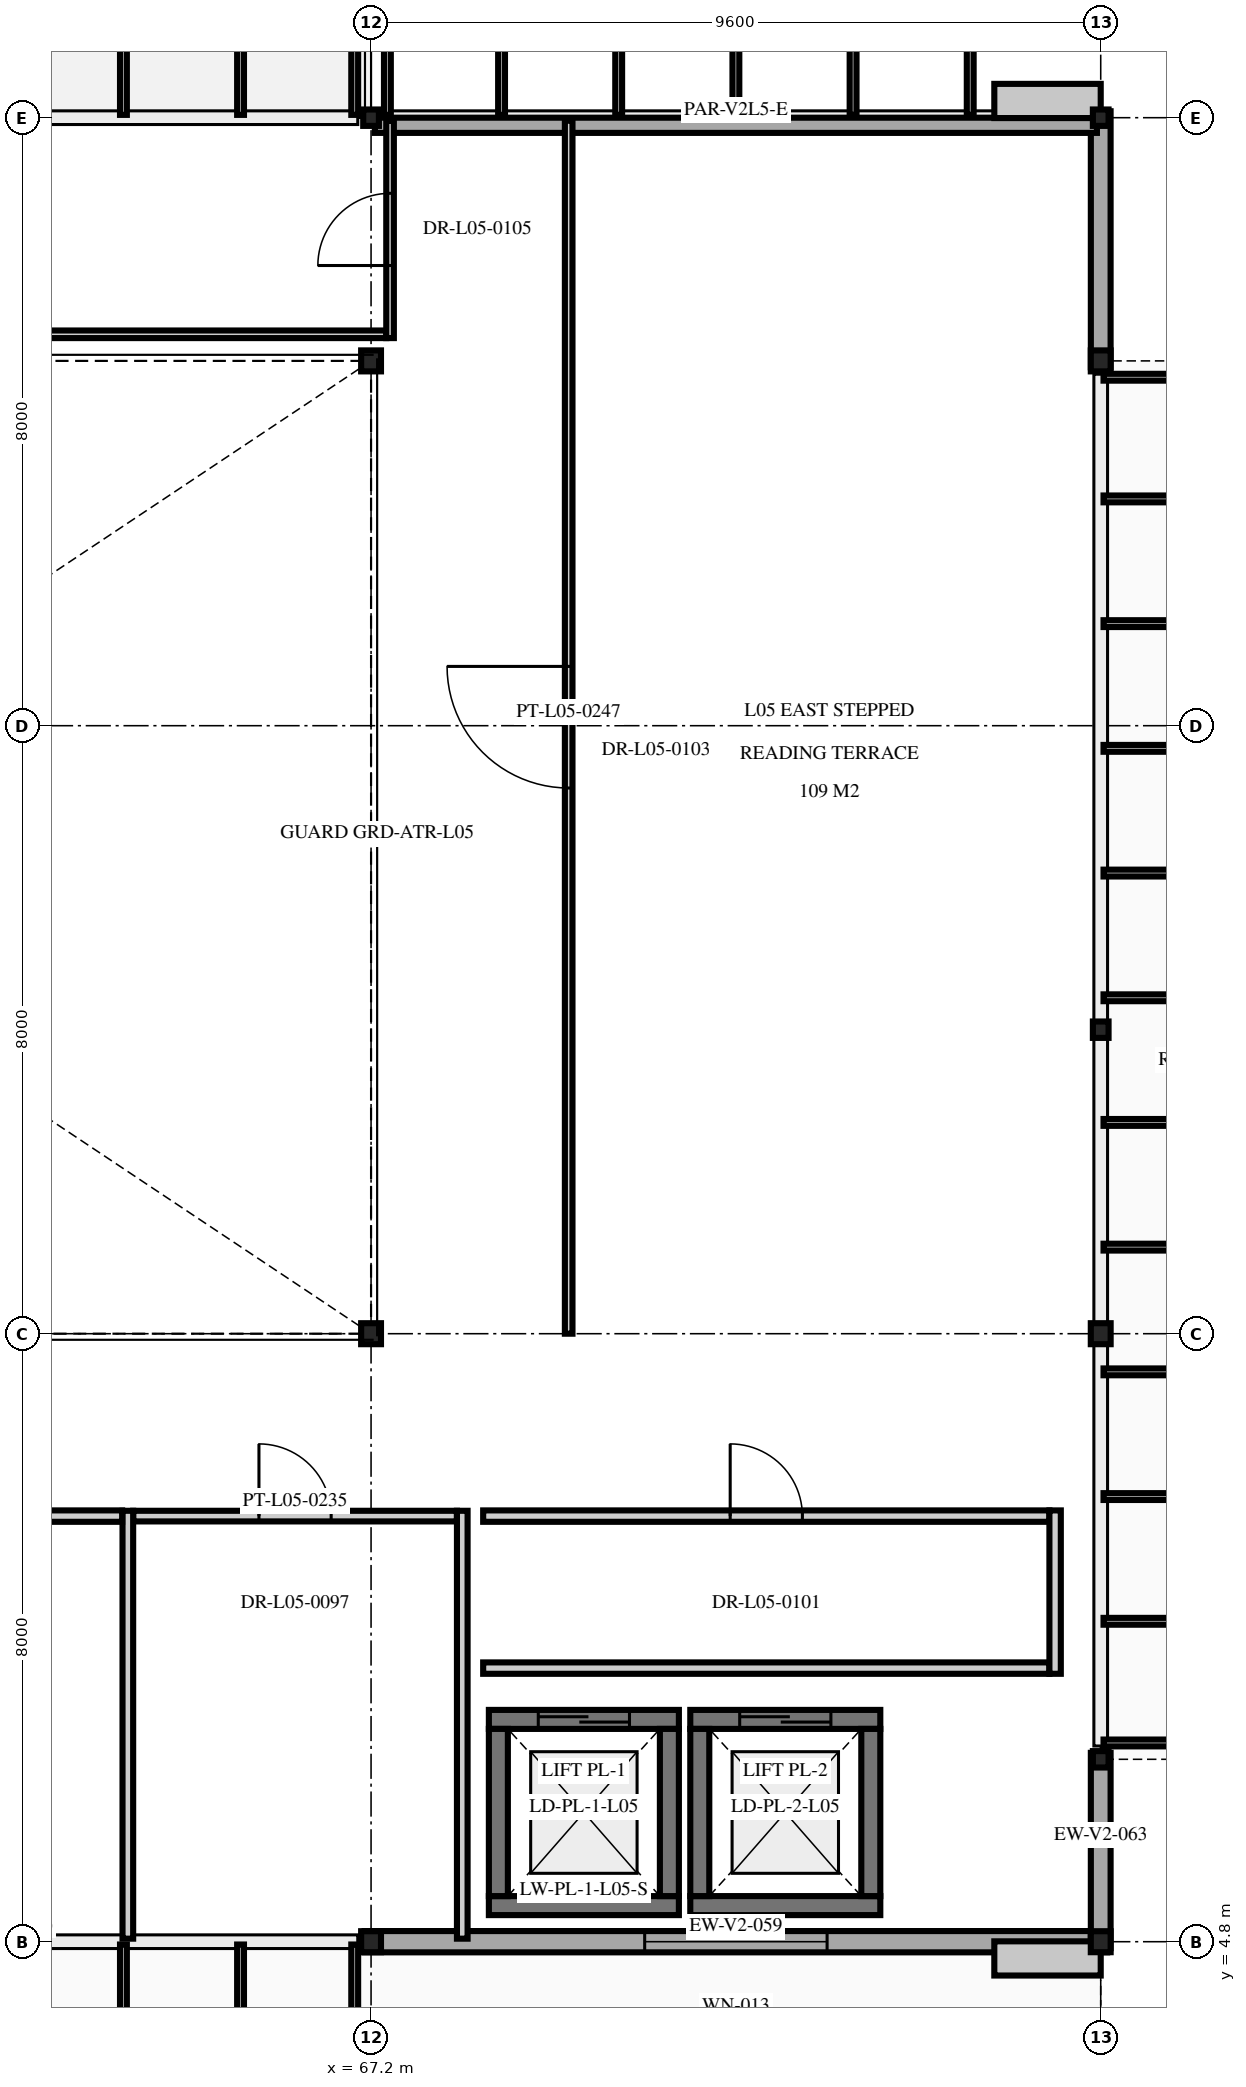
"""IFC4 building model, lengths in metres.
Left out: names, types, materials, properties, quantities, classifications, styles, units other than length and angle.
Written with IfcOpenShell. Run it as: python <this file> out.ifc"""

import sys

from ifc_helpers import new_model, si_unit, direction, frame, frame_2d, origin, origin_2d, place, context, subcontext, project, spatial, rectangle, i_section, extrude, element, fill, save


model = new_model("IFC4")
c1 = context("Model", 3, precision=1e-05, world=origin(), true_north=direction((0.0, 1.0)))
c2 = subcontext(c1, "Body", "Model", "MODEL_VIEW")
j1 = project(units=[si_unit("LENGTHUNIT", "METRE"), si_unit("PLANEANGLEUNIT", "RADIAN")], contexts=[c1])
p1 = place(None, origin())
s1 = spatial("IfcSite", under=j1, at=p1, CompositionType="ELEMENT")
p2 = place(p1, origin())
s2 = spatial("IfcBuilding", under=s1, at=p2, CompositionType="ELEMENT")
p3 = place(p2, frame((0.0, 0.0, 23.1)))
s3 = spatial("IfcBuildingStorey", under=s2, at=p3, CompositionType="ELEMENT", Elevation=23.1)
for number, where, z_axis, x_axis in (
    (1, (67.2, 4.8, 0.0), (0.0, 0.0, 1.0), (1.0, 0.0, 0.0)),
    (2, (67.2, 12.8, 0.0), (0.0, 0.0, 1.0), (1.0, 0.0, 0.0)),
    (3, (67.2, 25.6, 0.0), (0.0, 0.0, 1.0), (1.0, 0.0, 0.0)),
):
    element("IfcColumn", number, at=place(p3, frame(where, z_axis=z_axis, x_axis=x_axis)), inside=s3, PredefinedType="COLUMN", context=c2, shape_type="SweptSolid", body=[
        extrude(i_section(OverallWidth=0.261, OverallDepth=0.276, WebThickness=0.015, FlangeThickness=0.025, at=origin_2d()), origin(), (0.0, 0.0, 1.0), 4.5),
    ])
for number, where, z_axis, x_axis in (
    (4, (76.8, 4.8, 0.0), (0.0, 0.0, 1.0), (1.0, 0.0, 0.0)),
    (5, (76.8, 12.8, 0.0), (0.0, 0.0, 1.0), (1.0, 0.0, 0.0)),
    (6, (76.8, 25.6, 0.0), (0.0, 0.0, 1.0), (1.0, 0.0, 0.0)),
):
    element("IfcColumn", number, at=place(p3, frame(where, z_axis=z_axis, x_axis=x_axis)), inside=s3, PredefinedType="COLUMN", context=c2, shape_type="SweptSolid", body=[
        extrude(i_section(OverallWidth=0.261, OverallDepth=0.276, WebThickness=0.015, FlangeThickness=0.025, at=origin_2d()), origin(), (0.0, 0.0, 1.0), 3.793),
    ])
p4 = place(p3, frame((67.2, 28.8, 0.0), z_axis=(0.0, 0.0, 1.0), x_axis=(1.0, 0.0, 0.0)))
e7 = element("IfcColumn", 7, at=p4, inside=s3, PredefinedType="COLUMN", context=c2, shape_type="SweptSolid", body=[
    extrude(i_section(OverallWidth=0.206, OverallDepth=0.216, WebThickness=0.01, FlangeThickness=0.017, at=origin_2d()), origin(), (0.0, 0.0, 1.0), 4.5),
])
for number, where, z_axis, x_axis in (
    (8, (76.8, 28.8, 0.0), (0.0, 0.0, 1.0), (1.0, 0.0, 0.0)),
    (9, (76.8, 7.2, 0.0), (0.0, 0.0, 1.0), (1.0, 0.0, 0.0)),
    (10, (76.8, 16.8, 0.0), (0.0, 0.0, 1.0), (1.0, 0.0, 0.0)),
):
    element("IfcColumn", number, at=place(p3, frame(where, z_axis=z_axis, x_axis=x_axis)), inside=s3, PredefinedType="COLUMN", context=c2, shape_type="SweptSolid", body=[
        extrude(i_section(OverallWidth=0.206, OverallDepth=0.216, WebThickness=0.01, FlangeThickness=0.017, at=origin_2d()), origin(), (0.0, 0.0, 1.0), 3.793),
    ])
p5 = place(p3, frame((71.25, 5.275, 0.0), z_axis=(0.0, 0.0, 1.0), x_axis=(-1.0, 0.0, 0.0)))
e11 = element("IfcWall", 11, at=p5, inside=s3, PredefinedType="SHEAR", context=c2, shape_type="SweptSolid", body=[
    extrude(rectangle(XDim=2.5, YDim=0.25, at=frame_2d((1.25, 0.0))), origin(), (0.0, 0.0, 1.0), 5.636),
])
p6 = place(p3, frame((68.75, 7.725, 0.0), z_axis=(0.0, 0.0, 1.0), x_axis=(1.0, 0.0, 0.0)))
e12 = element("IfcWall", 12, at=p6, inside=s3, PredefinedType="SHEAR", context=c2, shape_type="SweptSolid", body=[
    extrude(rectangle(XDim=2.5, YDim=0.25, at=frame_2d((1.25, 0.0))), origin(), (0.0, 0.0, 1.0), 5.636),
])
p7 = place(p6, frame((0.65, 0.0, 0.0)))
e13 = element("IfcOpeningElement", 13, at=p7, cuts=e12, PredefinedType="OPENING", context=c2, shape_type="SweptSolid", body=[
    extrude(rectangle(XDim=1.2, YDim=2.2, at=frame_2d((0.6, 1.1))), frame((0.0, 0.135, 0.0), z_axis=(0.0, -1.0, 0.0), x_axis=(1.0, 0.0, 0.0)), (0.0, 0.0, 1.0), 0.27),
])
p8 = place(p3, frame((68.875, 5.4, 0.0), z_axis=(0.0, 0.0, 1.0), x_axis=(0.0, 1.0, 0.0)))
e14 = element("IfcWall", 14, at=p8, inside=s3, PredefinedType="SHEAR", context=c2, shape_type="SweptSolid", body=[
    extrude(rectangle(XDim=2.2, YDim=0.25, at=frame_2d((1.1, 0.0))), origin(), (0.0, 0.0, 1.0), 6.23),
])
p9 = place(p3, frame((71.125, 7.6, 0.0), z_axis=(0.0, 0.0, 1.0), x_axis=(0.0, -1.0, 0.0)))
e15 = element("IfcWall", 15, at=p9, inside=s3, PredefinedType="SHEAR", context=c2, shape_type="SweptSolid", body=[
    extrude(rectangle(XDim=2.2, YDim=0.25, at=frame_2d((1.1, 0.0))), origin(), (0.0, 0.0, 1.0), 5.667),
])
p10 = place(p3, frame((73.9, 5.275, 0.0), z_axis=(0.0, 0.0, 1.0), x_axis=(-1.0, 0.0, 0.0)))
e16 = element("IfcWall", 16, at=p10, inside=s3, PredefinedType="SHEAR", context=c2, shape_type="SweptSolid", body=[
    extrude(rectangle(XDim=2.5, YDim=0.25, at=frame_2d((1.25, 0.0))), origin(), (0.0, 0.0, 1.0), 4.973),
])
p11 = place(p3, frame((71.4, 7.725, 0.0), z_axis=(0.0, 0.0, 1.0), x_axis=(1.0, 0.0, 0.0)))
e17 = element("IfcWall", 17, at=p11, inside=s3, PredefinedType="SHEAR", context=c2, shape_type="SweptSolid", body=[
    extrude(rectangle(XDim=2.5, YDim=0.25, at=frame_2d((1.25, 0.0))), origin(), (0.0, 0.0, 1.0), 4.973),
])
p12 = place(p11, frame((0.65, 0.0, 0.0)))
e18 = element("IfcOpeningElement", 18, at=p12, cuts=e17, PredefinedType="OPENING", context=c2, shape_type="SweptSolid", body=[
    extrude(rectangle(XDim=1.2, YDim=2.2, at=frame_2d((0.6, 1.1))), frame((0.0, 0.135, 0.0), z_axis=(0.0, -1.0, 0.0), x_axis=(1.0, 0.0, 0.0)), (0.0, 0.0, 1.0), 0.27),
])
p13 = place(p3, frame((71.525, 5.4, 0.0), z_axis=(0.0, 0.0, 1.0), x_axis=(0.0, 1.0, 0.0)))
e19 = element("IfcWall", 19, at=p13, inside=s3, PredefinedType="SHEAR", context=c2, shape_type="SweptSolid", body=[
    extrude(rectangle(XDim=2.2, YDim=0.25, at=frame_2d((1.1, 0.0))), origin(), (0.0, 0.0, 1.0), 5.567),
])
p14 = place(p3, frame((73.775, 7.6, 0.0), z_axis=(0.0, 0.0, 1.0), x_axis=(0.0, -1.0, 0.0)))
e20 = element("IfcWall", 20, at=p14, inside=s3, PredefinedType="SHEAR", context=c2, shape_type="SweptSolid", body=[
    extrude(rectangle(XDim=2.2, YDim=0.25, at=frame_2d((1.1, 0.0))), origin(), (0.0, 0.0, 1.0), 5.005),
])
p15 = place(p3, frame((76.885, 4.8, 0.0), z_axis=(0.0, 0.0, 1.0), x_axis=(-1.0, 0.0, 0.0)))
e21 = element("IfcWall", 21, at=p15, inside=s3, PredefinedType="SOLIDWALL", context=c2, shape_type="SweptSolid", body=[
    extrude(rectangle(XDim=9.77, YDim=0.28, at=frame_2d((4.885, 0.0))), origin(), (0.0, 0.0, 1.0), 3.473),
])
p16 = place(p15, frame((3.685, 0.0, 0.95)))
e22 = element("IfcOpeningElement", 22, at=p16, cuts=e21, PredefinedType="OPENING", context=c2, shape_type="SweptSolid", body=[
    extrude(rectangle(XDim=2.4, YDim=2.1, at=frame_2d((1.2, 1.05))), frame((0.0, 0.15, 0.0), z_axis=(0.0, -1.0, 0.0), x_axis=(1.0, 0.0, 0.0)), (0.0, 0.0, 1.0), 0.3),
])
p17 = place(p3, frame((76.8, 7.285, 0.0), z_axis=(0.0, 0.0, 1.0), x_axis=(0.0, -1.0, 0.0)))
e23 = element("IfcWall", 23, at=p17, inside=s3, PredefinedType="SOLIDWALL", context=c2, shape_type="SweptSolid", body=[
    extrude(rectangle(XDim=2.57, YDim=0.26, at=frame_2d((1.285, 0.0))), origin(), (0.0, 0.0, 1.0), 3.473),
])
p18 = place(p3, frame((76.8, 28.885, 0.0), z_axis=(0.0, 0.0, 1.0), x_axis=(0.0, -1.0, 0.0)))
e24 = element("IfcWall", 24, at=p18, inside=s3, PredefinedType="SOLIDWALL", context=c2, shape_type="SweptSolid", body=[
    extrude(rectangle(XDim=3.37, YDim=0.26, at=frame_2d((1.685, 0.0))), origin(), (0.0, 0.0, 1.0), 3.466),
])
p19 = place(p3, frame((67.25, 28.7, 0.0), z_axis=(0.0, 0.0, 1.0), x_axis=(1.0, 0.0, 0.0)))
e25 = element("IfcWall", 25, at=p19, inside=s3, PredefinedType="PARAPET", context=c2, shape_type="SweptSolid", body=[
    extrude(rectangle(XDim=9.5, YDim=0.2, at=frame_2d((4.75, 0.0))), origin(), (0.0, 0.0, 1.0), 1.1),
])
p20 = place(p3, frame((64.07, 10.4, 0.0), z_axis=(0.0, 0.0, 1.0), x_axis=(1.0, 0.0, 0.0)))
e26 = element("IfcWall", 26, at=p20, inside=s3, PredefinedType="PARTITIONING", context=c2, shape_type="SweptSolid", body=[
    extrude(rectangle(XDim=4.26, YDim=0.14, at=frame_2d((2.13, 0.0))), origin(), (0.0, 0.0, 1.0), 6.351),
])
p21 = place(p20, frame((1.655, 0.0, 0.0)))
e27 = element("IfcOpeningElement", 27, at=p21, cuts=e26, PredefinedType="OPENING", context=c2, shape_type="SweptSolid", body=[
    extrude(rectangle(XDim=0.95, YDim=2.1, at=frame_2d((0.475, 1.05))), frame((0.0, 0.08, 0.0), z_axis=(0.0, -1.0, 0.0), x_axis=(1.0, 0.0, 0.0)), (0.0, 0.0, 1.0), 0.16),
])
p22 = place(p3, frame((64.0, 4.84, 0.0), z_axis=(0.0, 0.0, 1.0), x_axis=(0.0, 1.0, 0.0)))
e28 = element("IfcWall", 28, at=p22, inside=s3, PredefinedType="PARTITIONING", context=c2, shape_type="SweptSolid", body=[
    extrude(rectangle(XDim=5.63, YDim=0.14, at=frame_2d((2.815, 0.0))), origin(), (0.0, 0.0, 1.0), 5.873),
])
p23 = place(p3, frame((68.4, 4.84, 0.0), z_axis=(0.0, 0.0, 1.0), x_axis=(0.0, 1.0, 0.0)))
e29 = element("IfcWall", 29, at=p23, inside=s3, PredefinedType="PARTITIONING", context=c2, shape_type="SweptSolid", body=[
    extrude(rectangle(XDim=5.63, YDim=0.14, at=frame_2d((2.815, 0.0))), origin(), (0.0, 0.0, 1.0), 3.473),
])
p24 = place(p3, frame((57.6, 10.4, 0.0), z_axis=(0.0, 0.0, 1.0), x_axis=(1.0, 0.0, 0.0)))
e30 = element("IfcWall", 30, at=p24, inside=s3, PredefinedType="PARTITIONING", context=c2, shape_type="SweptSolid", body=[
    extrude(rectangle(XDim=6.325, YDim=0.15, at=frame_2d((3.163, 0.0))), origin(), (0.0, 0.0, 1.0), 7.452),
])
p25 = place(p24, frame((2.587, 0.0, 0.0)))
e31 = element("IfcOpeningElement", 31, at=p25, cuts=e30, PredefinedType="OPENING", context=c2, shape_type="SweptSolid", body=[
    extrude(rectangle(XDim=1.15, YDim=2.25, at=frame_2d((0.575, 1.125))), frame((0.0, 0.085, 0.0), z_axis=(0.0, -1.0, 0.0), x_axis=(1.0, 0.0, 0.0)), (0.0, 0.0, 1.0), 0.17),
])
p26 = place(p3, frame((68.675, 8.4, 0.0), z_axis=(0.0, 0.0, 1.0), x_axis=(1.0, 0.0, 0.0)))
e32 = element("IfcWall", 32, at=p26, inside=s3, PredefinedType="PARTITIONING", context=c2, shape_type="SweptSolid", body=[
    extrude(rectangle(XDim=7.45, YDim=0.15, at=frame_2d((3.725, 0.0))), origin(), (0.0, 0.0, 1.0), 4.274),
])
p27 = place(p3, frame((68.675, 10.4, 0.0), z_axis=(0.0, 0.0, 1.0), x_axis=(1.0, 0.0, 0.0)))
e33 = element("IfcWall", 33, at=p27, inside=s3, PredefinedType="PARTITIONING", context=c2, shape_type="SweptSolid", body=[
    extrude(rectangle(XDim=7.45, YDim=0.15, at=frame_2d((3.725, 0.0))), origin(), (0.0, 0.0, 1.0), 4.274),
])
p28 = place(p27, frame((3.25, 0.0, 0.0)))
e34 = element("IfcOpeningElement", 34, at=p28, cuts=e33, PredefinedType="OPENING", context=c2, shape_type="SweptSolid", body=[
    extrude(rectangle(XDim=0.95, YDim=2.15, at=frame_2d((0.475, 1.075))), frame((0.0, 0.085, 0.0), z_axis=(0.0, -1.0, 0.0), x_axis=(1.0, 0.0, 0.0)), (0.0, 0.0, 1.0), 0.17),
])
p29 = place(p3, frame((76.2, 8.325, 0.0), z_axis=(0.0, 0.0, 1.0), x_axis=(0.0, 1.0, 0.0)))
e35 = element("IfcWall", 35, at=p29, inside=s3, PredefinedType="PARTITIONING", context=c2, shape_type="SweptSolid", body=[
    extrude(rectangle(XDim=2.15, YDim=0.15, at=frame_2d((1.075, 0.0))), origin(), (0.0, 0.0, 1.0), 4.383),
])
p30 = place(p3, frame((69.8, 12.8, 0.0), z_axis=(0.0, 0.0, 1.0), x_axis=(0.0, 1.0, 0.0)))
e36 = element("IfcWall", 36, at=p30, inside=s3, PredefinedType="MOVABLE", context=c2, shape_type="SweptSolid", body=[
    extrude(rectangle(XDim=15.96, YDim=0.1, at=frame_2d((7.98, 0.0))), origin(), (0.0, 0.0, 1.0), 3.466),
])
p31 = place(p30, frame((7.18, 0.0, 0.0)))
e37 = element("IfcOpeningElement", 37, at=p31, cuts=e36, PredefinedType="OPENING", context=c2, shape_type="SweptSolid", body=[
    extrude(rectangle(XDim=1.6, YDim=2.25, at=frame_2d((0.8, 1.125))), frame((0.0, 0.06, 0.0), z_axis=(0.0, -1.0, 0.0), x_axis=(1.0, 0.0, 0.0)), (0.0, 0.0, 1.0), 0.12),
])
p32 = place(p3, frame((57.6, 25.95, 0.0), z_axis=(0.0, 0.0, 1.0), x_axis=(1.0, 0.0, 0.0)))
e38 = element("IfcWall", 38, at=p32, inside=s3, PredefinedType="MOVABLE", context=c2, shape_type="SweptSolid", body=[
    extrude(rectangle(XDim=9.8, YDim=0.1, at=frame_2d((4.9, 0.0))), origin(), (0.0, 0.0, 1.0), 6.374),
])
p33 = place(p3, frame((67.45, 25.9, 0.0), z_axis=(0.0, 0.0, 1.0), x_axis=(0.0, 1.0, 0.0)))
e39 = element("IfcWall", 39, at=p33, inside=s3, PredefinedType="MOVABLE", context=c2, shape_type="SweptSolid", body=[
    extrude(rectangle(XDim=2.86, YDim=0.1, at=frame_2d((1.43, 0.0))), origin(), (0.0, 0.0, 1.0), 3.466),
])
p34 = place(p33, frame((0.955, 0.0, 0.0)))
e40 = element("IfcOpeningElement", 40, at=p34, cuts=e39, PredefinedType="OPENING", context=c2, shape_type="SweptSolid", body=[
    extrude(rectangle(XDim=0.95, YDim=2.15, at=frame_2d((0.475, 1.075))), frame((0.0, 0.06, 0.0), z_axis=(0.0, -1.0, 0.0), x_axis=(1.0, 0.0, 0.0)), (0.0, 0.0, 1.0), 0.12),
])
p35 = place(p7, origin())
e41 = element("IfcDoor", 41, at=p35, inside=s3, OperationType="DOUBLE_DOOR_SLIDING", PredefinedType="DOOR", context=c2, shape_type="SweptSolid", body=[
    extrude(rectangle(XDim=1.2, YDim=2.2, at=frame_2d((0.6, 1.1))), frame((0.0, 0.025, 0.0), z_axis=(0.0, -1.0, 0.0), x_axis=(1.0, 0.0, 0.0)), (0.0, 0.0, 1.0), 0.05),
])
fill(e13, e41)
p36 = place(p12, origin())
e42 = element("IfcDoor", 42, at=p36, inside=s3, OperationType="DOUBLE_DOOR_SLIDING", PredefinedType="DOOR", context=c2, shape_type="SweptSolid", body=[
    extrude(rectangle(XDim=1.2, YDim=2.2, at=frame_2d((0.6, 1.1))), frame((0.0, 0.025, 0.0), z_axis=(0.0, -1.0, 0.0), x_axis=(1.0, 0.0, 0.0)), (0.0, 0.0, 1.0), 0.05),
])
fill(e18, e42)
p37 = place(p16, origin())
e43 = element("IfcWindow", 43, at=p37, inside=s3, PartitioningType="SINGLE_PANEL", PredefinedType="WINDOW", context=c2, shape_type="SweptSolid", body=[
    extrude(rectangle(XDim=2.4, YDim=2.1, at=frame_2d((1.2, 1.05))), frame((0.0, 0.03, 0.0), z_axis=(0.0, -1.0, 0.0), x_axis=(1.0, 0.0, 0.0)), (0.0, 0.0, 1.0), 0.06),
])
fill(e22, e43)
p38 = place(p21, origin())
e44 = element("IfcDoor", 44, at=p38, inside=s3, OperationType="SINGLE_SWING_LEFT", PredefinedType="DOOR", context=c2, shape_type="SweptSolid", body=[
    extrude(rectangle(XDim=0.95, YDim=2.1, at=frame_2d((0.475, 1.05))), frame((0.0, 0.025, 0.0), z_axis=(0.0, -1.0, 0.0), x_axis=(1.0, 0.0, 0.0)), (0.0, 0.0, 1.0), 0.05),
])
fill(e27, e44)
p39 = place(p28, origin())
e45 = element("IfcDoor", 45, at=p39, inside=s3, OperationType="SINGLE_SWING_LEFT", PredefinedType="DOOR", context=c2, shape_type="SweptSolid", body=[
    extrude(rectangle(XDim=0.95, YDim=2.15, at=frame_2d((0.475, 1.075))), frame((0.0, 0.025, 0.0), z_axis=(0.0, -1.0, 0.0), x_axis=(1.0, 0.0, 0.0)), (0.0, 0.0, 1.0), 0.05),
])
fill(e34, e45)
p40 = place(p31, origin())
e46 = element("IfcDoor", 46, at=p40, inside=s3, OperationType="DOUBLE_DOOR_SINGLE_SWING", PredefinedType="DOOR", context=c2, shape_type="SweptSolid", body=[
    extrude(rectangle(XDim=1.6, YDim=2.25, at=frame_2d((0.8, 1.125))), frame((0.0, 0.025, 0.0), z_axis=(0.0, -1.0, 0.0), x_axis=(1.0, 0.0, 0.0)), (0.0, 0.0, 1.0), 0.05),
])
fill(e37, e46)
p41 = place(p34, origin())
e47 = element("IfcDoor", 47, at=p41, inside=s3, OperationType="SINGLE_SWING_LEFT", PredefinedType="DOOR", context=c2, shape_type="SweptSolid", body=[
    extrude(rectangle(XDim=0.95, YDim=2.15, at=frame_2d((0.475, 1.075))), frame((0.0, 0.025, 0.0), z_axis=(0.0, -1.0, 0.0), x_axis=(1.0, 0.0, 0.0)), (0.0, 0.0, 1.0), 0.05),
])
fill(e40, e47)
save(model, sys.argv[1])
